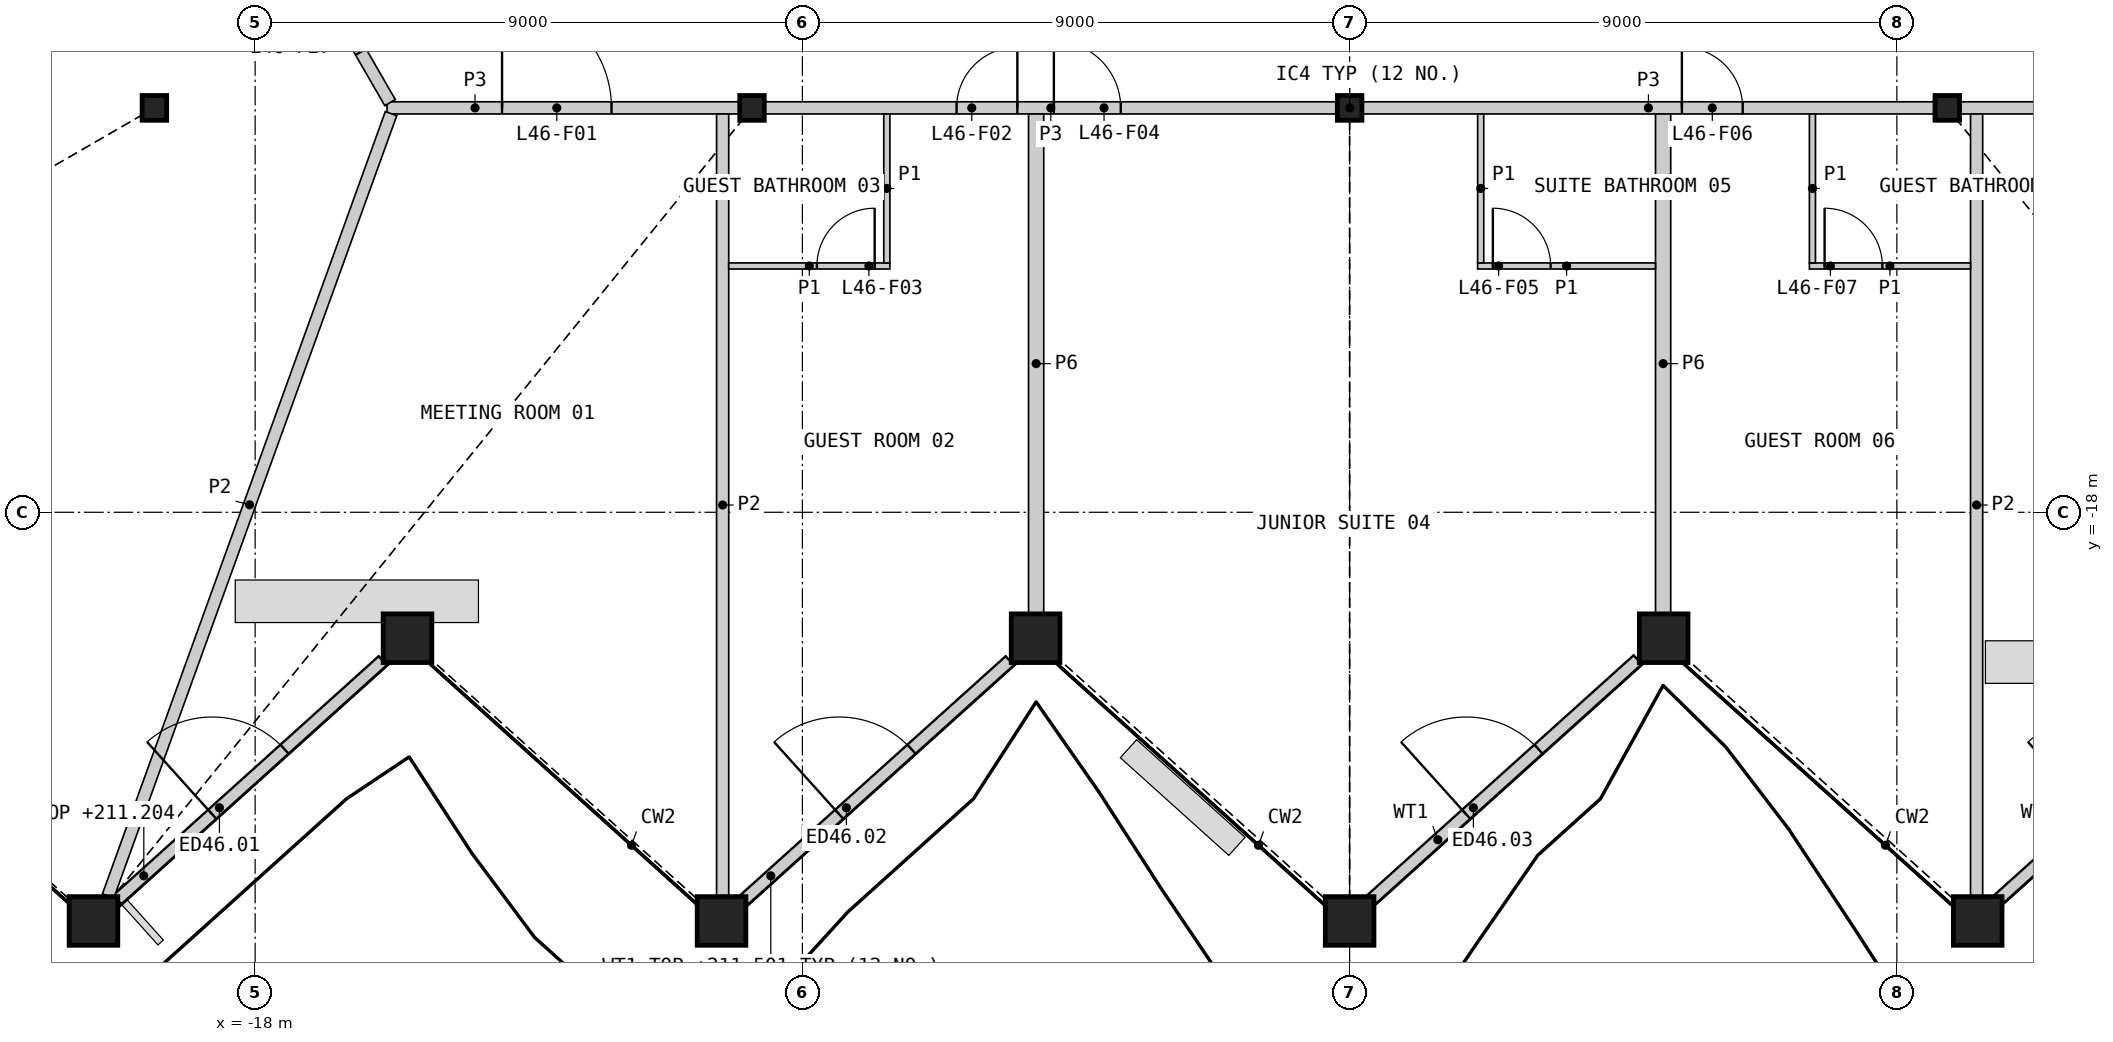
"""IFC4 building model, lengths in metres.
Left out: names, types, materials, properties, quantities, classifications, styles, units other than length and angle.
Written with IfcOpenShell. Run it as: python <this file> out.ifc"""

import sys

from ifc_helpers import new_model, si_unit, direction, frame, frame_2d, origin, origin_2d, place, context, subcontext, project, spatial, rectangle, hollow_rectangle, i_section, extrude, element, fill, save


model = new_model("IFC4")
c1 = context("Model", 3, precision=1e-05, world=origin(), true_north=direction((0.0, 1.0)))
c2 = subcontext(c1, "Body", "Model", "MODEL_VIEW")
j1 = project(units=[si_unit("LENGTHUNIT", "METRE"), si_unit("PLANEANGLEUNIT", "RADIAN")], contexts=[c1])
p1 = place(None, origin())
s1 = spatial("IfcSite", under=j1, at=p1, CompositionType="ELEMENT")
p2 = place(p1, origin())
s2 = spatial("IfcBuilding", under=s1, at=p2, CompositionType="ELEMENT")
p3 = place(p2, frame((0.0, 0.0, 208.8)))
s3 = spatial("IfcBuildingStorey", under=s2, at=p3, CompositionType="ELEMENT", Elevation=208.8)
for number, where, z_axis, x_axis in (
    (1, (-20.659, -24.722, 0.0), (0.0, 0.0, 1.0), (1.0, 0.0, 0.0)),
    (2, (-15.494, -20.071, 0.0), (0.0, 0.0, 1.0), (1.0, 0.0, 0.0)),
    (3, (-10.329, -24.722, 0.0), (0.0, 0.0, 1.0), (1.0, 0.0, 0.0)),
    (4, (-5.165, -20.071, 0.0), (0.0, 0.0, 1.0), (1.0, 0.0, 0.0)),
    (5, (0.0, -24.722, 0.0), (0.0, 0.0, 1.0), (1.0, 0.0, 0.0)),
    (6, (5.165, -20.071, 0.0), (0.0, 0.0, 1.0), (1.0, 0.0, 0.0)),
    (7, (10.329, -24.722, 0.0), (0.0, 0.0, 1.0), (1.0, 0.0, 0.0)),
):
    element("IfcColumn", number, at=place(p3, frame(where, z_axis=z_axis, x_axis=x_axis)), inside=s3, PredefinedType="COLUMN", context=c2, shape_type="SweptSolid", body=[
        extrude(hollow_rectangle(XDim=0.8, YDim=0.8, WallThickness=0.05, at=origin_2d()), origin(), (0.0, 0.0, 1.0), 3.6),
    ])
for number, where, z_axis, x_axis in (
    (8, (-19.657, -11.349, 0.0), (0.0, 0.0, 1.0), (1.0, 0.0, 0.0)),
    (9, (-9.828, -11.349, 0.0), (0.0, 0.0, 1.0), (1.0, 0.0, 0.0)),
    (10, (0.0, -11.349, 0.0), (0.0, 0.0, 1.0), (1.0, 0.0, 0.0)),
    (11, (9.828, -11.349, 0.0), (0.0, 0.0, 1.0), (1.0, 0.0, 0.0)),
):
    element("IfcColumn", number, at=place(p3, frame(where, z_axis=z_axis, x_axis=x_axis)), inside=s3, PredefinedType="COLUMN", context=c2, shape_type="SweptSolid", body=[
        extrude(i_section(OverallWidth=0.404, OverallDepth=0.407, WebThickness=0.027, FlangeThickness=0.044, at=origin_2d()), origin(), (0.0, 0.0, 1.0), 3.6),
    ])
p4 = place(p3, frame((-20.267, -24.373, 0.0), z_axis=(0.0, 0.0, 1.0), x_axis=(0.743163950832, 0.669109364891, 0.0)))
e12 = element("IfcWall", 12, at=p4, inside=s3, PredefinedType="SOLIDWALL", context=c2, shape_type="SweptSolid", body=[
    extrude(rectangle(XDim=5.875, YDim=0.2, at=frame_2d((2.938, 0.0))), origin(), (0.0, 0.0, 1.0), 2.404),
])
p5 = place(p4, frame((2.101, 0.0, 0.0)))
e13 = element("IfcOpeningElement", 13, at=p5, cuts=e12, PredefinedType="OPENING", context=c2, shape_type="SweptSolid", body=[
    extrude(rectangle(XDim=1.6, YDim=2.4, at=frame_2d((0.8, 1.2))), frame((0.0, 0.11, 0.0), z_axis=(0.0, -1.0, 0.0), x_axis=(1.0, 0.0, 0.0)), (0.0, 0.0, 1.0), 0.22),
])
p6 = place(p3, frame((-9.956, -24.373, 0.0), z_axis=(0.0, 0.0, 1.0), x_axis=(0.743163950832, 0.669109364891, 0.0)))
e14 = element("IfcWall", 14, at=p6, inside=s3, PredefinedType="SOLIDWALL", context=c2, shape_type="SweptSolid", body=[
    extrude(rectangle(XDim=5.875, YDim=0.2, at=frame_2d((2.938, 0.0))), origin(), (0.0, 0.0, 1.0), 2.701),
])
p7 = place(p6, frame((2.101, 0.0, 0.0)))
e15 = element("IfcOpeningElement", 15, at=p7, cuts=e14, PredefinedType="OPENING", context=c2, shape_type="SweptSolid", body=[
    extrude(rectangle(XDim=1.6, YDim=2.4, at=frame_2d((0.8, 1.2))), frame((0.0, 0.11, 0.0), z_axis=(0.0, -1.0, 0.0), x_axis=(1.0, 0.0, 0.0)), (0.0, 0.0, 1.0), 0.22),
])
p8 = place(p3, frame((0.355, -24.373, 0.0), z_axis=(0.0, 0.0, 1.0), x_axis=(0.743166509731, 0.669106522771, 0.0)))
e16 = element("IfcWall", 16, at=p8, inside=s3, PredefinedType="SOLIDWALL", context=c2, shape_type="SweptSolid", body=[
    extrude(rectangle(XDim=5.897, YDim=0.2, at=frame_2d((2.949, 0.0))), origin(), (0.0, 0.0, 1.0), 2.701),
])
p9 = place(p8, frame((2.101, 0.0, 0.0)))
e17 = element("IfcOpeningElement", 17, at=p9, cuts=e16, PredefinedType="OPENING", context=c2, shape_type="SweptSolid", body=[
    extrude(rectangle(XDim=1.6, YDim=2.4, at=frame_2d((0.8, 1.2))), frame((0.0, 0.11, 0.0), z_axis=(0.0, -1.0, 0.0), x_axis=(1.0, 0.0, 0.0)), (0.0, 0.0, 1.0), 0.22),
])
p10 = place(p3, frame((10.667, -24.373, 0.0), z_axis=(0.0, 0.0, 1.0), x_axis=(0.743154671439, 0.669119671149, 0.0)))
e18 = element("IfcWall", 18, at=p10, inside=s3, PredefinedType="SOLIDWALL", context=c2, shape_type="SweptSolid", body=[
    extrude(rectangle(XDim=5.919, YDim=0.2, at=frame_2d((2.959, 0.0))), origin(), (0.0, 0.0, 1.0), 2.701),
])
p11 = place(p10, frame((2.101, 0.0, 0.0)))
e19 = element("IfcOpeningElement", 19, at=p11, cuts=e18, PredefinedType="OPENING", context=c2, shape_type="SweptSolid", body=[
    extrude(rectangle(XDim=1.6, YDim=2.4, at=frame_2d((0.8, 1.2))), frame((0.0, 0.11, 0.0), z_axis=(0.0, -1.0, 0.0), x_axis=(1.0, 0.0, 0.0)), (0.0, 0.0, 1.0), 0.22),
])
p12 = place(p3, frame((-9.615, -11.349, 0.0), z_axis=(0.0, 0.0, 1.0), x_axis=(1.0, 0.0, 0.0)))
e20 = element("IfcWall", 20, at=p12, inside=s3, PredefinedType="PARTITIONING", context=c2, shape_type="SweptSolid", body=[
    extrude(rectangle(XDim=9.401, YDim=0.2, at=frame_2d((4.701, 0.0))), origin(), (0.0, 0.0, 1.0), 3.25),
])
p13 = place(p12, frame((3.15, 0.0, 0.0)))
e21 = element("IfcOpeningElement", 21, at=p13, cuts=e20, PredefinedType="OPENING", context=c2, shape_type="SweptSolid", body=[
    extrude(rectangle(XDim=1.0, YDim=2.1, at=frame_2d((0.5, 1.05))), frame((0.0, 0.11, 0.0), z_axis=(0.0, -1.0, 0.0), x_axis=(1.0, 0.0, 0.0)), (0.0, 0.0, 1.0), 0.22),
])
p14 = place(p12, frame((4.751, 0.0, 0.0)))
e22 = element("IfcOpeningElement", 22, at=p14, cuts=e20, PredefinedType="OPENING", context=c2, shape_type="SweptSolid", body=[
    extrude(rectangle(XDim=1.1, YDim=2.1, at=frame_2d((0.55, 1.05))), frame((0.0, 0.11, 0.0), z_axis=(0.0, -1.0, 0.0), x_axis=(1.0, 0.0, 0.0)), (0.0, 0.0, 1.0), 0.22),
])
p15 = place(p3, frame((0.214, -11.349, 0.0), z_axis=(0.0, 0.0, 1.0), x_axis=(1.0, 0.0, 0.0)))
e23 = element("IfcWall", 23, at=p15, inside=s3, PredefinedType="PARTITIONING", context=c2, shape_type="SweptSolid", body=[
    extrude(rectangle(XDim=9.401, YDim=0.2, at=frame_2d((4.701, 0.0))), origin(), (0.0, 0.0, 1.0), 3.25),
])
p16 = place(p15, frame((5.251, 0.0, 0.0)))
e24 = element("IfcOpeningElement", 24, at=p16, cuts=e23, PredefinedType="OPENING", context=c2, shape_type="SweptSolid", body=[
    extrude(rectangle(XDim=1.0, YDim=2.1, at=frame_2d((0.5, 1.05))), frame((0.0, 0.11, 0.0), z_axis=(0.0, -1.0, 0.0), x_axis=(1.0, 0.0, 0.0)), (0.0, 0.0, 1.0), 0.22),
])
for number, where, z_axis, x_axis in (
    (25, (-5.156, -19.661, 0.0), (0.0, 0.0, 1.0), (0.0, 1.0, 0.0)),
    (26, (5.156, -19.661, 0.0), (0.0, 0.0, 1.0), (0.0, 1.0, 0.0)),
):
    element("IfcWall", number, at=place(p3, frame(where, z_axis=z_axis, x_axis=x_axis)), inside=s3, PredefinedType="PARTITIONING", context=c2, shape_type="SweptSolid", body=[
        extrude(rectangle(XDim=8.212, YDim=0.25, at=frame_2d((4.106, 0.0))), origin(), (0.0, 0.0, 1.0), 2.404),
    ])
p17 = place(p3, frame((-15.831, -11.349, 0.0), z_axis=(0.0, 0.0, 1.0), x_axis=(1.0, 0.0, 0.0)))
e27 = element("IfcWall", 27, at=p17, inside=s3, PredefinedType="PARTITIONING", context=c2, shape_type="SweptSolid", body=[
    extrude(rectangle(XDim=5.789, YDim=0.2, at=frame_2d((2.894, 0.0))), origin(), (0.0, 0.0, 1.0), 3.25),
])
p18 = place(p17, frame((1.892, 0.0, 0.0)))
e28 = element("IfcOpeningElement", 28, at=p18, cuts=e27, PredefinedType="OPENING", context=c2, shape_type="SweptSolid", body=[
    extrude(rectangle(XDim=1.8, YDim=2.1, at=frame_2d((0.9, 1.05))), frame((0.0, 0.11, 0.0), z_axis=(0.0, -1.0, 0.0), x_axis=(1.0, 0.0, 0.0)), (0.0, 0.0, 1.0), 0.22),
])
p19 = place(p3, frame((10.042, -11.349, 0.0), z_axis=(0.0, 0.0, 1.0), x_axis=(1.0, 0.0, 0.0)))
e29 = element("IfcWall", 29, at=p19, inside=s3, PredefinedType="PARTITIONING", context=c2, shape_type="SweptSolid", body=[
    extrude(rectangle(XDim=5.789, YDim=0.2, at=frame_2d((2.894, 0.0))), origin(), (0.0, 0.0, 1.0), 3.25),
])
p20 = place(p19, frame((2.097, 0.0, 0.0)))
e30 = element("IfcOpeningElement", 30, at=p20, cuts=e29, PredefinedType="OPENING", context=c2, shape_type="SweptSolid", body=[
    extrude(rectangle(XDim=1.8, YDim=2.1, at=frame_2d((0.9, 1.05))), frame((0.0, 0.11, 0.0), z_axis=(0.0, -1.0, 0.0), x_axis=(1.0, 0.0, 0.0)), (0.0, 0.0, 1.0), 0.22),
])
p21 = place(p3, frame((-17.644, -8.035, 0.0), z_axis=(0.0, 0.0, 1.0), x_axis=(0.499958791762, -0.866049194065, 0.0)))
e31 = element("IfcWall", 31, at=p21, inside=s3, PredefinedType="PARTITIONING", context=c2, shape_type="SweptSolid", body=[
    extrude(rectangle(XDim=3.726, YDim=0.2, at=frame_2d((1.863, 0.0))), origin(), (0.0, 0.0, 1.0), 3.25),
])
p22 = place(p21, frame((0.963, 0.0, 0.0)))
e32 = element("IfcOpeningElement", 32, at=p22, cuts=e31, PredefinedType="OPENING", context=c2, shape_type="SweptSolid", body=[
    extrude(rectangle(XDim=1.8, YDim=2.1, at=frame_2d((0.9, 1.05))), frame((0.0, 0.11, 0.0), z_axis=(0.0, -1.0, 0.0), x_axis=(1.0, 0.0, 0.0)), (0.0, 0.0, 1.0), 0.22),
])
p23 = place(p3, frame((-20.418, -24.312, 0.0), z_axis=(0.0, 0.0, 1.0), x_axis=(0.340057865258, 0.940404513109, 0.0)))
e33 = element("IfcWall", 33, at=p23, inside=s3, PredefinedType="PARTITIONING", context=c2, shape_type="SweptSolid", body=[
    extrude(rectangle(XDim=13.684, YDim=0.2, at=frame_2d((6.842, 0.0))), origin(), (0.0, 0.0, 1.0), 2.404),
])
for number, where, z_axis, x_axis in (
    (34, (-10.311, -24.312, 0.0), (0.0, 0.0, 1.0), (0.0, 1.0, 0.0)),
    (35, (10.311, -24.312, 0.0), (0.0, 0.0, 1.0), (0.0, 1.0, 0.0)),
):
    element("IfcWall", number, at=place(p3, frame(where, z_axis=z_axis, x_axis=x_axis)), inside=s3, PredefinedType="PARTITIONING", context=c2, shape_type="SweptSolid", body=[
        extrude(rectangle(XDim=12.863, YDim=0.2, at=frame_2d((6.431, 0.0))), origin(), (0.0, 0.0, 1.0), 2.404),
    ])
p24 = place(p3, frame((2.106, -13.949, 0.0), z_axis=(0.0, 0.0, 1.0), x_axis=(1.0, 0.0, 0.0)))
e36 = element("IfcWall", 36, at=p24, inside=s3, PredefinedType="PARTITIONING", context=c2, shape_type="SweptSolid", body=[
    extrude(rectangle(XDim=2.925, YDim=0.1, at=frame_2d((1.462, 0.0))), origin(), (0.0, 0.0, 1.0), 2.404),
])
p25 = place(p24, frame((0.25, 0.0, 0.0)))
e37 = element("IfcOpeningElement", 37, at=p25, cuts=e36, PredefinedType="OPENING", context=c2, shape_type="SweptSolid", body=[
    extrude(rectangle(XDim=0.95, YDim=2.1, at=frame_2d((0.475, 1.05))), frame((0.0, 0.06, 0.0), z_axis=(0.0, -1.0, 0.0), x_axis=(1.0, 0.0, 0.0)), (0.0, 0.0, 1.0), 0.12),
])
p26 = place(p3, frame((-10.211, -13.949, 0.0), z_axis=(0.0, 0.0, 1.0), x_axis=(1.0, 0.0, 0.0)))
e38 = element("IfcWall", 38, at=p26, inside=s3, PredefinedType="PARTITIONING", context=c2, shape_type="SweptSolid", body=[
    extrude(rectangle(XDim=2.65, YDim=0.1, at=frame_2d((1.325, 0.0))), origin(), (0.0, 0.0, 1.0), 2.404),
])
p27 = place(p26, frame((1.45, 0.0, 0.0)))
e39 = element("IfcOpeningElement", 39, at=p27, cuts=e38, PredefinedType="OPENING", context=c2, shape_type="SweptSolid", body=[
    extrude(rectangle(XDim=0.95, YDim=2.1, at=frame_2d((0.475, 1.05))), frame((0.0, 0.06, 0.0), z_axis=(0.0, -1.0, 0.0), x_axis=(1.0, 0.0, 0.0)), (0.0, 0.0, 1.0), 0.12),
])
p28 = place(p3, frame((7.561, -13.949, 0.0), z_axis=(0.0, 0.0, 1.0), x_axis=(1.0, 0.0, 0.0)))
e40 = element("IfcWall", 40, at=p28, inside=s3, PredefinedType="PARTITIONING", context=c2, shape_type="SweptSolid", body=[
    extrude(rectangle(XDim=2.65, YDim=0.1, at=frame_2d((1.325, 0.0))), origin(), (0.0, 0.0, 1.0), 2.404),
])
p29 = place(p28, frame((0.25, 0.0, 0.0)))
e41 = element("IfcOpeningElement", 41, at=p29, cuts=e40, PredefinedType="OPENING", context=c2, shape_type="SweptSolid", body=[
    extrude(rectangle(XDim=0.95, YDim=2.1, at=frame_2d((0.475, 1.05))), frame((0.0, 0.06, 0.0), z_axis=(0.0, -1.0, 0.0), x_axis=(1.0, 0.0, 0.0)), (0.0, 0.0, 1.0), 0.12),
])
for number, where, z_axis, x_axis in (
    (42, (-7.611, -13.899, 0.0), (0.0, 0.0, 1.0), (0.0, 1.0, 0.0)),
    (43, (2.156, -13.899, 0.0), (0.0, 0.0, 1.0), (0.0, 1.0, 0.0)),
    (44, (7.611, -13.899, 0.0), (0.0, 0.0, 1.0), (0.0, 1.0, 0.0)),
):
    element("IfcWall", number, at=place(p3, frame(where, z_axis=z_axis, x_axis=x_axis)), inside=s3, PredefinedType="PARTITIONING", context=c2, shape_type="SweptSolid", body=[
        extrude(rectangle(XDim=2.45, YDim=0.1, at=frame_2d((1.225, 0.0))), origin(), (0.0, 0.0, 1.0), 2.404),
    ])
p30 = place(p5, origin())
e45 = element("IfcDoor", 45, at=p30, inside=s3, OperationType="DOUBLE_DOOR_SINGLE_SWING", PredefinedType="DOOR", context=c2, shape_type="SweptSolid", body=[
    extrude(rectangle(XDim=1.6, YDim=2.4, at=frame_2d((0.8, 1.2))), frame((0.0, 0.025, 0.0), z_axis=(0.0, -1.0, 0.0), x_axis=(1.0, 0.0, 0.0)), (0.0, 0.0, 1.0), 0.05),
])
fill(e13, e45)
p31 = place(p7, origin())
e46 = element("IfcDoor", 46, at=p31, inside=s3, OperationType="DOUBLE_DOOR_SINGLE_SWING", PredefinedType="DOOR", context=c2, shape_type="SweptSolid", body=[
    extrude(rectangle(XDim=1.6, YDim=2.4, at=frame_2d((0.8, 1.2))), frame((0.0, 0.025, 0.0), z_axis=(0.0, -1.0, 0.0), x_axis=(1.0, 0.0, 0.0)), (0.0, 0.0, 1.0), 0.05),
])
fill(e15, e46)
p32 = place(p9, origin())
e47 = element("IfcDoor", 47, at=p32, inside=s3, OperationType="DOUBLE_DOOR_SINGLE_SWING", PredefinedType="DOOR", context=c2, shape_type="SweptSolid", body=[
    extrude(rectangle(XDim=1.6, YDim=2.4, at=frame_2d((0.8, 1.2))), frame((0.0, 0.025, 0.0), z_axis=(0.0, -1.0, 0.0), x_axis=(1.0, 0.0, 0.0)), (0.0, 0.0, 1.0), 0.05),
])
fill(e17, e47)
p33 = place(p18, origin())
e48 = element("IfcDoor", 48, at=p33, inside=s3, OperationType="DOUBLE_DOOR_SINGLE_SWING", PredefinedType="DOOR", context=c2, shape_type="SweptSolid", body=[
    extrude(rectangle(XDim=1.8, YDim=2.1, at=frame_2d((0.9, 1.05))), frame((0.0, 0.025, 0.0), z_axis=(0.0, -1.0, 0.0), x_axis=(1.0, 0.0, 0.0)), (0.0, 0.0, 1.0), 0.05),
])
fill(e28, e48)
p34 = place(p13, origin())
e49 = element("IfcDoor", 49, at=p34, inside=s3, OperationType="SINGLE_SWING_RIGHT", PredefinedType="DOOR", context=c2, shape_type="SweptSolid", body=[
    extrude(rectangle(XDim=1.0, YDim=2.1, at=frame_2d((0.5, 1.05))), frame((0.0, 0.025, 0.0), z_axis=(0.0, -1.0, 0.0), x_axis=(1.0, 0.0, 0.0)), (0.0, 0.0, 1.0), 0.05),
])
fill(e21, e49)
p35 = place(p27, origin())
e50 = element("IfcDoor", 50, at=p35, inside=s3, OperationType="SINGLE_SWING_RIGHT", PredefinedType="DOOR", context=c2, shape_type="SweptSolid", body=[
    extrude(rectangle(XDim=0.95, YDim=2.1, at=frame_2d((0.475, 1.05))), frame((0.0, 0.025, 0.0), z_axis=(0.0, -1.0, 0.0), x_axis=(1.0, 0.0, 0.0)), (0.0, 0.0, 1.0), 0.05),
])
fill(e39, e50)
p36 = place(p14, origin())
e51 = element("IfcDoor", 51, at=p36, inside=s3, OperationType="SINGLE_SWING_LEFT", PredefinedType="DOOR", context=c2, shape_type="SweptSolid", body=[
    extrude(rectangle(XDim=1.1, YDim=2.1, at=frame_2d((0.55, 1.05))), frame((0.0, 0.025, 0.0), z_axis=(0.0, -1.0, 0.0), x_axis=(1.0, 0.0, 0.0)), (0.0, 0.0, 1.0), 0.05),
])
fill(e22, e51)
p37 = place(p25, origin())
e52 = element("IfcDoor", 52, at=p37, inside=s3, OperationType="SINGLE_SWING_LEFT", PredefinedType="DOOR", context=c2, shape_type="SweptSolid", body=[
    extrude(rectangle(XDim=0.95, YDim=2.1, at=frame_2d((0.475, 1.05))), frame((0.0, 0.025, 0.0), z_axis=(0.0, -1.0, 0.0), x_axis=(1.0, 0.0, 0.0)), (0.0, 0.0, 1.0), 0.05),
])
fill(e37, e52)
p38 = place(p16, origin())
e53 = element("IfcDoor", 53, at=p38, inside=s3, OperationType="SINGLE_SWING_LEFT", PredefinedType="DOOR", context=c2, shape_type="SweptSolid", body=[
    extrude(rectangle(XDim=1.0, YDim=2.1, at=frame_2d((0.5, 1.05))), frame((0.0, 0.025, 0.0), z_axis=(0.0, -1.0, 0.0), x_axis=(1.0, 0.0, 0.0)), (0.0, 0.0, 1.0), 0.05),
])
fill(e24, e53)
p39 = place(p29, origin())
e54 = element("IfcDoor", 54, at=p39, inside=s3, OperationType="SINGLE_SWING_LEFT", PredefinedType="DOOR", context=c2, shape_type="SweptSolid", body=[
    extrude(rectangle(XDim=0.95, YDim=2.1, at=frame_2d((0.475, 1.05))), frame((0.0, 0.025, 0.0), z_axis=(0.0, -1.0, 0.0), x_axis=(1.0, 0.0, 0.0)), (0.0, 0.0, 1.0), 0.05),
])
fill(e41, e54)
p40 = place(p22, origin())
e55 = element("IfcDoor", 55, at=p40, inside=s3, OperationType="DOUBLE_DOOR_SINGLE_SWING", PredefinedType="DOOR", context=c2, shape_type="SweptSolid", body=[
    extrude(rectangle(XDim=1.8, YDim=2.1, at=frame_2d((0.9, 1.05))), frame((0.0, 0.025, 0.0), z_axis=(0.0, -1.0, 0.0), x_axis=(1.0, 0.0, 0.0)), (0.0, 0.0, 1.0), 0.05),
])
fill(e32, e55)
save(model, sys.argv[1])
